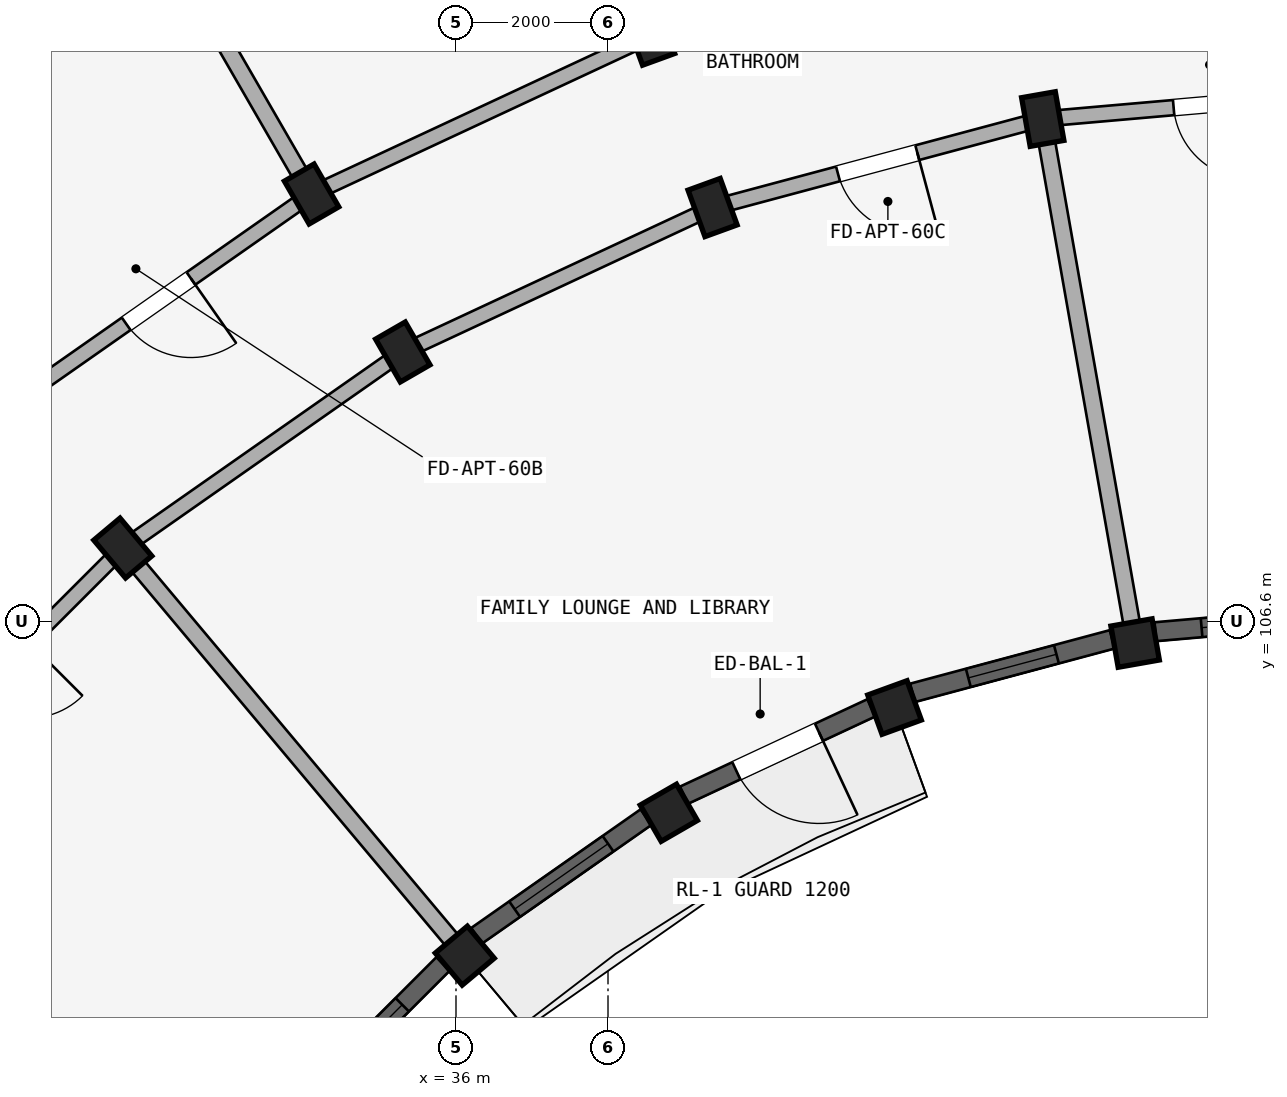
"""IFC4 building model, lengths in metres.
Left out: names, types, materials, properties, quantities, classifications, styles, units other than length and angle.
Written with IfcOpenShell. Run it as: python <this file> out.ifc"""

import sys

from ifc_helpers import new_model, si_unit, direction, frame, frame_2d, origin, origin_2d, place, context, subcontext, project, spatial, rectangle, extrude, element, fill, save


model = new_model("IFC4")
c1 = context("Model", 3, precision=1e-05, world=origin(), true_north=direction((0.0, 1.0)))
c2 = subcontext(c1, "Body", "Model", "MODEL_VIEW")
j1 = project(units=[si_unit("LENGTHUNIT", "METRE"), si_unit("PLANEANGLEUNIT", "RADIAN")], contexts=[c1])
p1 = place(None, origin())
s1 = spatial("IfcSite", under=j1, at=p1, CompositionType="ELEMENT")
p2 = place(p1, origin())
s2 = spatial("IfcBuilding", under=s1, at=p2, CompositionType="ELEMENT")
p3 = place(p2, frame((0.0, 0.0, 33.9)))
s3 = spatial("IfcBuildingStorey", under=s2, at=p3, CompositionType="ELEMENT", Elevation=33.9)
p4 = place(p3, frame((44.935, 106.314, 0.0), z_axis=(0.0, 0.0, 1.0), x_axis=(0.984807753012, 0.173648177667, 0.0)))
e1 = element("IfcColumn", 1, at=p4, inside=s3, PredefinedType="COLUMN", context=c2, shape_type="SweptSolid", body=[
    extrude(rectangle(XDim=0.55, YDim=0.55, at=origin_2d()), origin(), (0.0, 0.0, 1.0), 2.93),
])
p5 = place(p3, frame((43.72, 113.208, 0.0), z_axis=(0.0, 0.0, 1.0), x_axis=(0.984807753012, 0.173648177667, 0.0)))
e2 = element("IfcColumn", 2, at=p5, inside=s3, PredefinedType="COLUMN", context=c2, shape_type="SweptSolid", body=[
    extrude(rectangle(XDim=0.45, YDim=0.65, at=origin_2d()), origin(), (0.0, 0.0, 1.0), 2.93),
])
p6 = place(p3, frame((41.77, 105.466, 0.0), z_axis=(0.0, 0.0, 1.0), x_axis=(0.939692620786, 0.342020143326, 0.0)))
e3 = element("IfcColumn", 3, at=p6, inside=s3, PredefinedType="COLUMN", context=c2, shape_type="SweptSolid", body=[
    extrude(rectangle(XDim=0.55, YDim=0.55, at=origin_2d()), origin(), (0.0, 0.0, 1.0), 2.93),
])
for number, where, z_axis, x_axis in (
    (4, (39.376, 112.044, 0.0), (0.0, 0.0, 1.0), (0.94, 0.342, 0.0)),
    (5, (38.555, 114.299, 0.0), (0.0, 0.0, 1.0), (0.94, 0.342, 0.0)),
):
    element("IfcColumn", number, at=place(p3, frame(where, z_axis=z_axis, x_axis=x_axis)), inside=s3, PredefinedType="COLUMN", context=c2, shape_type="SweptSolid", body=[
        extrude(rectangle(XDim=0.45, YDim=0.65, at=origin_2d()), origin(), (0.0, 0.0, 1.0), 2.93),
    ])
p7 = place(p3, frame((38.8, 104.081, 0.0), z_axis=(0.0, 0.0, 1.0), x_axis=(0.866025403784, 0.5, 0.0)))
e6 = element("IfcColumn", 6, at=p7, inside=s3, PredefinedType="COLUMN", context=c2, shape_type="SweptSolid", body=[
    extrude(rectangle(XDim=0.55, YDim=0.55, at=origin_2d()), origin(), (0.0, 0.0, 1.0), 2.93),
])
for number, where, z_axis, x_axis in (
    (7, (35.3, 110.144, 0.0), (0.0, 0.0, 1.0), (0.866, 0.5, 0.0)),
    (8, (34.1, 112.222, 0.0), (0.0, 0.0, 1.0), (0.866, 0.5, 0.0)),
):
    element("IfcColumn", number, at=place(p3, frame(where, z_axis=z_axis, x_axis=x_axis)), inside=s3, PredefinedType="COLUMN", context=c2, shape_type="SweptSolid", body=[
        extrude(rectangle(XDim=0.45, YDim=0.65, at=origin_2d()), origin(), (0.0, 0.0, 1.0), 2.93),
    ])
p8 = place(p3, frame((36.115, 102.202, 0.0), z_axis=(0.0, 0.0, 1.0), x_axis=(0.766044443119, 0.642787609687, 0.0)))
e9 = element("IfcColumn", 9, at=p8, inside=s3, PredefinedType="COLUMN", context=c2, shape_type="SweptSolid", body=[
    extrude(rectangle(XDim=0.55, YDim=0.55, at=origin_2d()), origin(), (0.0, 0.0, 1.0), 2.93),
])
p9 = place(p3, frame((31.616, 107.564, 0.0), z_axis=(0.0, 0.0, 1.0), x_axis=(0.766044443119, 0.642787609687, 0.0)))
e10 = element("IfcColumn", 10, at=p9, inside=s3, PredefinedType="COLUMN", context=c2, shape_type="SweptSolid", body=[
    extrude(rectangle(XDim=0.45, YDim=0.65, at=origin_2d()), origin(), (0.0, 0.0, 1.0), 2.93),
])
p10 = place(p3, frame((48.2, 113.6, 0.0), z_axis=(0.0, 0.0, 1.0), x_axis=(-0.996191949488, -0.087187153726, 0.0)))
e11 = element("IfcWall", 11, at=p10, inside=s3, PredefinedType="STANDARD", context=c2, shape_type="SweptSolid", body=[
    extrude(rectangle(XDim=4.497, YDim=0.2, at=frame_2d((2.249, 0.0))), origin(), (0.0, 0.0, 1.0), 2.372),
])
p11 = place(p10, frame((1.729, 0.0, 0.0)))
e12 = element("IfcOpeningElement", 12, at=p11, cuts=e11, PredefinedType="OPENING", context=c2, shape_type="SweptSolid", body=[
    extrude(rectangle(XDim=1.04, YDim=2.15, at=frame_2d((0.52, 1.075))), frame((0.0, 0.11, 0.0), z_axis=(0.0, -1.0, 0.0), x_axis=(1.0, 0.0, 0.0)), (0.0, 0.0, 1.0), 0.22),
])
p12 = place(p3, frame((43.72, 113.208, 0.0), z_axis=(0.0, 0.0, 1.0), x_axis=(-0.965934240054, -0.258787642463, 0.0)))
e13 = element("IfcWall", 13, at=p12, inside=s3, PredefinedType="STANDARD", context=c2, shape_type="SweptSolid", body=[
    extrude(rectangle(XDim=4.497, YDim=0.2, at=frame_2d((2.249, 0.0))), origin(), (0.0, 0.0, 1.0), 2.372),
])
p13 = place(p12, frame((1.709, 0.0, 0.0)))
e14 = element("IfcOpeningElement", 14, at=p13, cuts=e13, PredefinedType="OPENING", context=c2, shape_type="SweptSolid", body=[
    extrude(rectangle(XDim=1.08, YDim=2.15, at=frame_2d((0.54, 1.075))), frame((0.0, 0.11, 0.0), z_axis=(0.0, -1.0, 0.0), x_axis=(1.0, 0.0, 0.0)), (0.0, 0.0, 1.0), 0.22),
])
p14 = place(p3, frame((39.376, 112.044, 0.0), z_axis=(0.0, 0.0, 1.0), x_axis=(-0.906307919131, -0.422617978463, 0.0)))
e15 = element("IfcWall", 15, at=p14, inside=s3, PredefinedType="STANDARD", context=c2, shape_type="SweptSolid", body=[
    extrude(rectangle(XDim=4.497, YDim=0.2, at=frame_2d((2.249, 0.0))), origin(), (0.0, 0.0, 1.0), 2.372),
])
p15 = place(p3, frame((38.555, 114.299, 0.0), z_axis=(0.0, 0.0, 1.0), x_axis=(-0.906302381024, -0.422629854778, 0.0)))
e16 = element("IfcWall", 16, at=p15, inside=s3, PredefinedType="STANDARD", context=c2, shape_type="SweptSolid", body=[
    extrude(rectangle(XDim=4.915, YDim=0.2, at=frame_2d((2.458, 0.0))), origin(), (0.0, 0.0, 1.0), 2.372),
])
p16 = place(p3, frame((35.3, 110.144, 0.0), z_axis=(0.0, 0.0, 1.0), x_axis=(-0.819155404658, -0.573571637217, 0.0)))
e17 = element("IfcWall", 17, at=p16, inside=s3, PredefinedType="STANDARD", context=c2, shape_type="SweptSolid", body=[
    extrude(rectangle(XDim=4.497, YDim=0.2, at=frame_2d((2.249, 0.0))), origin(), (0.0, 0.0, 1.0), 2.372),
])
p17 = place(p3, frame((34.1, 112.222, 0.0), z_axis=(0.0, 0.0, 1.0), x_axis=(-0.819140911474, -0.573592335331, 0.0)))
e18 = element("IfcWall", 18, at=p17, inside=s3, PredefinedType="STANDARD", context=c2, shape_type="SweptSolid", body=[
    extrude(rectangle(XDim=4.916, YDim=0.2, at=frame_2d((2.458, 0.0))), origin(), (0.0, 0.0, 1.0), 2.372),
])
p18 = place(p17, frame((1.938, 0.0, 0.0)))
e19 = element("IfcOpeningElement", 19, at=p18, cuts=e18, PredefinedType="OPENING", context=c2, shape_type="SweptSolid", body=[
    extrude(rectangle(XDim=1.04, YDim=2.15, at=frame_2d((0.52, 1.075))), frame((0.0, 0.11, 0.0), z_axis=(0.0, -1.0, 0.0), x_axis=(1.0, 0.0, 0.0)), (0.0, 0.0, 1.0), 0.22),
])
p19 = place(p3, frame((31.616, 107.564, 0.0), z_axis=(0.0, 0.0, 1.0), x_axis=(-0.707106781187, -0.707106781187, 0.0)))
e20 = element("IfcWall", 20, at=p19, inside=s3, PredefinedType="STANDARD", context=c2, shape_type="SweptSolid", body=[
    extrude(rectangle(XDim=4.497, YDim=0.2, at=frame_2d((2.249, 0.0))), origin(), (0.0, 0.0, 1.0), 2.372),
])
p20 = place(p19, frame((1.749, 0.0, 0.0)))
e21 = element("IfcOpeningElement", 21, at=p20, cuts=e20, PredefinedType="OPENING", context=c2, shape_type="SweptSolid", body=[
    extrude(rectangle(XDim=1.0, YDim=2.15, at=frame_2d((0.5, 1.075))), frame((0.0, 0.11, 0.0), z_axis=(0.0, -1.0, 0.0), x_axis=(1.0, 0.0, 0.0)), (0.0, 0.0, 1.0), 0.22),
])
p21 = place(p3, frame((44.901, 106.511, 0.0), z_axis=(0.0, 0.0, 1.0), x_axis=(-0.173647089161, 0.984807944945, 0.0)))
e22 = element("IfcWall", 22, at=p21, inside=s3, PredefinedType="STANDARD", context=c2, shape_type="SweptSolid", body=[
    extrude(rectangle(XDim=6.75, YDim=0.22, at=frame_2d((3.375, 0.0))), origin(), (0.0, 0.0, 1.0), 2.372),
])
p22 = place(p3, frame((34.05, 112.309, 0.0), z_axis=(0.0, 0.0, 1.0), x_axis=(-0.499997843263, 0.866026648973, 0.0)))
e23 = element("IfcWall", 23, at=p22, inside=s3, PredefinedType="STANDARD", context=c2, shape_type="SweptSolid", body=[
    extrude(rectangle(XDim=17.42, YDim=0.22, at=frame_2d((8.71, 0.0))), origin(), (0.0, 0.0, 1.0), 2.372),
])
p23 = place(p3, frame((35.987, 102.355, 0.0), z_axis=(0.0, 0.0, 1.0), x_axis=(-0.642784846501, 0.766046761698, 0.0)))
e24 = element("IfcWall", 24, at=p23, inside=s3, PredefinedType="STANDARD", context=c2, shape_type="SweptSolid", body=[
    extrude(rectangle(XDim=6.75, YDim=0.22, at=frame_2d((3.375, 0.0))), origin(), (0.0, 0.0, 1.0), 2.372),
])
p24 = place(p3, frame((47.751, 106.686, 0.0), z_axis=(0.0, 0.0, 1.0), x_axis=(-0.996188847542, -0.087222589008, 0.0)))
e25 = element("IfcWall", 25, at=p24, inside=s3, PredefinedType="STANDARD", context=c2, shape_type="SweptSolid", body=[
    extrude(rectangle(XDim=2.558, YDim=0.25, at=frame_2d((1.279, 0.0))), origin(), (0.0, 0.0, 1.0), 2.472),
])
p25 = place(p24, frame((0.448, 0.0, 0.622)))
e26 = element("IfcOpeningElement", 26, at=p25, cuts=e25, PredefinedType="OPENING", context=c2, shape_type="SweptSolid", body=[
    extrude(rectangle(XDim=1.5, YDim=1.65, at=frame_2d((0.75, 0.825))), frame((0.0, 0.135, 0.0), z_axis=(0.0, -1.0, 0.0), x_axis=(1.0, 0.0, 0.0)), (0.0, 0.0, 1.0), 0.27),
])
p26 = place(p3, frame((44.634, 106.363, 0.0), z_axis=(0.0, 0.0, 1.0), x_axis=(-0.965928818058, -0.258807879411, 0.0)))
e27 = element("IfcWall", 27, at=p26, inside=s3, PredefinedType="STANDARD", context=c2, shape_type="SweptSolid", body=[
    extrude(rectangle(XDim=2.72, YDim=0.25, at=frame_2d((1.36, 0.0))), origin(), (0.0, 0.0, 1.0), 2.472),
])
p27 = place(p26, frame((0.76, 0.0, 0.772)))
e28 = element("IfcOpeningElement", 28, at=p27, cuts=e27, PredefinedType="OPENING", context=c2, shape_type="SweptSolid", body=[
    extrude(rectangle(XDim=1.2, YDim=1.5, at=frame_2d((0.6, 0.75))), frame((0.0, 0.135, 0.0), z_axis=(0.0, -1.0, 0.0), x_axis=(1.0, 0.0, 0.0)), (0.0, 0.0, 1.0), 0.27),
])
p28 = place(p3, frame((41.465, 105.462, 0.0), z_axis=(0.0, 0.0, 1.0), x_axis=(-0.906302358412, -0.422629903269, 0.0)))
e29 = element("IfcWall", 29, at=p28, inside=s3, PredefinedType="STANDARD", context=c2, shape_type="SweptSolid", body=[
    extrude(rectangle(XDim=2.72, YDim=0.25, at=frame_2d((1.36, 0.0))), origin(), (0.0, 0.0, 1.0), 2.472),
])
p29 = place(p28, frame((0.76, 0.0, 0.0)))
e30 = element("IfcOpeningElement", 30, at=p29, cuts=e29, PredefinedType="OPENING", context=c2, shape_type="SweptSolid", body=[
    extrude(rectangle(XDim=1.2, YDim=2.15, at=frame_2d((0.6, 1.075))), frame((0.0, 0.135, 0.0), z_axis=(0.0, -1.0, 0.0), x_axis=(1.0, 0.0, 0.0)), (0.0, 0.0, 1.0), 0.27),
])
p30 = place(p3, frame((38.5, 104.024, 0.0), z_axis=(0.0, 0.0, 1.0), x_axis=(-0.819126475299, -0.573612950921, 0.0)))
e31 = element("IfcWall", 31, at=p30, inside=s3, PredefinedType="STANDARD", context=c2, shape_type="SweptSolid", body=[
    extrude(rectangle(XDim=2.72, YDim=0.25, at=frame_2d((1.36, 0.0))), origin(), (0.0, 0.0, 1.0), 2.472),
])
p31 = place(p30, frame((0.61, 0.0, 0.622)))
e32 = element("IfcOpeningElement", 32, at=p31, cuts=e31, PredefinedType="OPENING", context=c2, shape_type="SweptSolid", body=[
    extrude(rectangle(XDim=1.5, YDim=1.65, at=frame_2d((0.75, 0.825))), frame((0.0, 0.135, 0.0), z_axis=(0.0, -1.0, 0.0), x_axis=(1.0, 0.0, 0.0)), (0.0, 0.0, 1.0), 0.27),
])
p32 = place(p3, frame((35.83, 102.093, 0.0), z_axis=(0.0, 0.0, 1.0), x_axis=(-0.707106781187, -0.707106781187, 0.0)))
e33 = element("IfcWall", 33, at=p32, inside=s3, PredefinedType="STANDARD", context=c2, shape_type="SweptSolid", body=[
    extrude(rectangle(XDim=2.72, YDim=0.25, at=frame_2d((1.36, 0.0))), origin(), (0.0, 0.0, 1.0), 2.472),
])
p33 = place(p32, frame((0.76, 0.0, 0.772)))
e34 = element("IfcOpeningElement", 34, at=p33, cuts=e33, PredefinedType="OPENING", context=c2, shape_type="SweptSolid", body=[
    extrude(rectangle(XDim=1.2, YDim=1.5, at=frame_2d((0.6, 0.75))), frame((0.0, 0.135, 0.0), z_axis=(0.0, -1.0, 0.0), x_axis=(1.0, 0.0, 0.0)), (0.0, 0.0, 1.0), 0.27),
])
p34 = place(p25, origin())
e35 = element("IfcWindow", 35, at=p34, inside=s3, PartitioningType="DOUBLE_PANEL_VERTICAL", PredefinedType="WINDOW", context=c2, shape_type="SweptSolid", body=[
    extrude(rectangle(XDim=1.5, YDim=1.65, at=frame_2d((0.75, 0.825))), frame((0.0, 0.03, 0.0), z_axis=(0.0, -1.0, 0.0), x_axis=(1.0, 0.0, 0.0)), (0.0, 0.0, 1.0), 0.06),
])
fill(e26, e35)
p35 = place(p27, origin())
e36 = element("IfcWindow", 36, at=p35, inside=s3, PartitioningType="SINGLE_PANEL", PredefinedType="WINDOW", context=c2, shape_type="SweptSolid", body=[
    extrude(rectangle(XDim=1.2, YDim=1.5, at=frame_2d((0.6, 0.75))), frame((0.0, 0.03, 0.0), z_axis=(0.0, -1.0, 0.0), x_axis=(1.0, 0.0, 0.0)), (0.0, 0.0, 1.0), 0.06),
])
fill(e28, e36)
p36 = place(p31, origin())
e37 = element("IfcWindow", 37, at=p36, inside=s3, PartitioningType="DOUBLE_PANEL_VERTICAL", PredefinedType="WINDOW", context=c2, shape_type="SweptSolid", body=[
    extrude(rectangle(XDim=1.5, YDim=1.65, at=frame_2d((0.75, 0.825))), frame((0.0, 0.03, 0.0), z_axis=(0.0, -1.0, 0.0), x_axis=(1.0, 0.0, 0.0)), (0.0, 0.0, 1.0), 0.06),
])
fill(e32, e37)
p37 = place(p33, origin())
e38 = element("IfcWindow", 38, at=p37, inside=s3, PartitioningType="SINGLE_PANEL", PredefinedType="WINDOW", context=c2, shape_type="SweptSolid", body=[
    extrude(rectangle(XDim=1.2, YDim=1.5, at=frame_2d((0.6, 0.75))), frame((0.0, 0.03, 0.0), z_axis=(0.0, -1.0, 0.0), x_axis=(1.0, 0.0, 0.0)), (0.0, 0.0, 1.0), 0.06),
])
fill(e34, e38)
p38 = place(p18, origin())
e39 = element("IfcDoor", 39, at=p38, inside=s3, OperationType="SINGLE_SWING_LEFT", PredefinedType="DOOR", context=c2, shape_type="SweptSolid", body=[
    extrude(rectangle(XDim=1.04, YDim=2.15, at=frame_2d((0.52, 1.075))), frame((0.0, 0.025, 0.0), z_axis=(0.0, -1.0, 0.0), x_axis=(1.0, 0.0, 0.0)), (0.0, 0.0, 1.0), 0.05),
])
fill(e19, e39)
p39 = place(p11, origin())
e40 = element("IfcDoor", 40, at=p39, inside=s3, OperationType="SINGLE_SWING_LEFT", PredefinedType="DOOR", context=c2, shape_type="SweptSolid", body=[
    extrude(rectangle(XDim=1.04, YDim=2.15, at=frame_2d((0.52, 1.075))), frame((0.0, 0.025, 0.0), z_axis=(0.0, -1.0, 0.0), x_axis=(1.0, 0.0, 0.0)), (0.0, 0.0, 1.0), 0.05),
])
fill(e12, e40)
p40 = place(p13, frame((1.08, 0.0, 0.0), z_axis=(0.0, 0.0, 1.0), x_axis=(-1.0, 0.0, 0.0)))
e41 = element("IfcDoor", 41, at=p40, inside=s3, OperationType="SINGLE_SWING_RIGHT", PredefinedType="DOOR", context=c2, shape_type="SweptSolid", body=[
    extrude(rectangle(XDim=1.08, YDim=2.15, at=frame_2d((0.54, 1.075))), frame((0.0, 0.025, 0.0), z_axis=(0.0, -1.0, 0.0), x_axis=(1.0, 0.0, 0.0)), (0.0, 0.0, 1.0), 0.05),
])
fill(e14, e41)
p41 = place(p29, origin())
e42 = element("IfcDoor", 42, at=p41, inside=s3, OperationType="SINGLE_SWING_LEFT", PredefinedType="DOOR", context=c2, shape_type="SweptSolid", body=[
    extrude(rectangle(XDim=1.2, YDim=2.15, at=frame_2d((0.6, 1.075))), frame((0.0, 0.025, 0.0), z_axis=(0.0, -1.0, 0.0), x_axis=(1.0, 0.0, 0.0)), (0.0, 0.0, 1.0), 0.05),
])
fill(e30, e42)
save(model, sys.argv[1])
